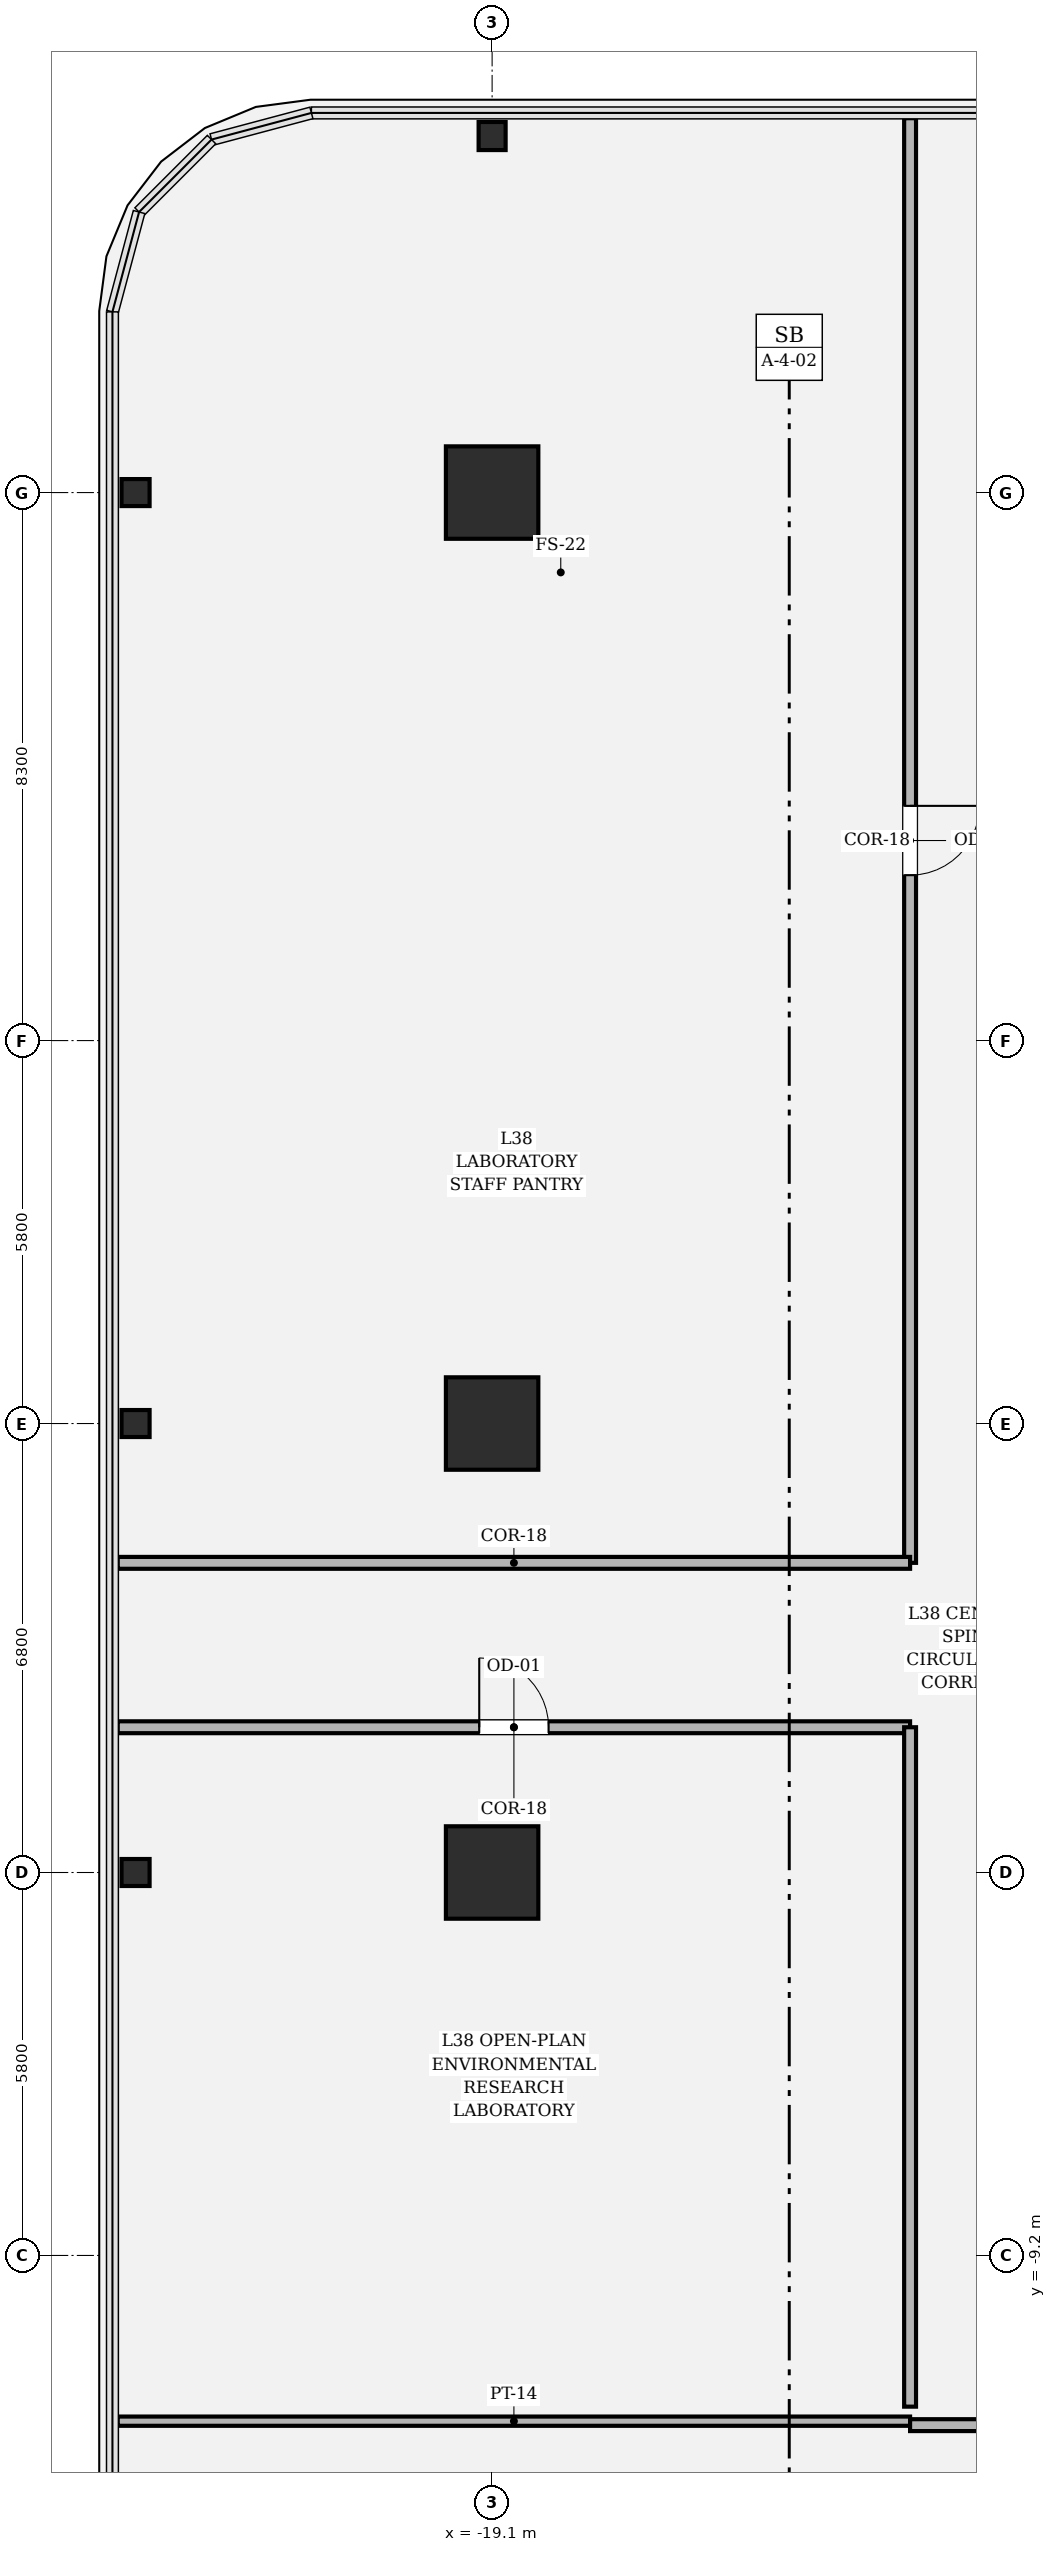
"""IFC4 building model, lengths in metres.
Left out: names, types, materials, properties, quantities, classifications, styles, units other than length and angle.
Written with IfcOpenShell. Run it as: python <this file> out.ifc"""

import sys

from ifc_helpers import new_model, si_unit, direction, frame, frame_2d, origin, origin_2d, place, context, subcontext, project, spatial, rectangle, hollow_rectangle, i_section, extrude, element, fill, save


model = new_model("IFC4")
c1 = context("Model", 3, precision=1e-05, world=origin(), true_north=direction((0.0, 1.0)))
c2 = subcontext(c1, "Body", "Model", "MODEL_VIEW")
j1 = project(units=[si_unit("LENGTHUNIT", "METRE"), si_unit("PLANEANGLEUNIT", "RADIAN")], contexts=[c1])
p1 = place(None, origin())
s1 = spatial("IfcSite", under=j1, at=p1, CompositionType="ELEMENT")
p2 = place(p1, origin())
s2 = spatial("IfcBuilding", under=s1, at=p2, CompositionType="ELEMENT")
p3 = place(p2, frame((0.0, 0.0, 164.1)))
s3 = spatial("IfcBuildingStorey", under=s2, at=p3, CompositionType="ELEMENT", Elevation=164.1)
for number, where, z_axis, x_axis in (
    (1, (-19.1, 17.5, 0.0), (0.0, 0.0, 1.0), (1.0, 0.0, 0.0)),
    (2, (-19.1, 3.4, 0.0), (0.0, 0.0, 1.0), (1.0, 0.0, 0.0)),
    (3, (-19.1, -3.4, 0.0), (0.0, 0.0, 1.0), (1.0, 0.0, 0.0)),
):
    element("IfcColumn", number, at=place(p3, frame(where, z_axis=z_axis, x_axis=x_axis)), inside=s3, PredefinedType="COLUMN", context=c2, shape_type="SweptSolid", body=[
        extrude(hollow_rectangle(XDim=1.4, YDim=1.4, WallThickness=0.042, at=origin_2d()), origin(), (0.0, 0.0, 1.0), 4.05),
    ])
for number, where, z_axis, x_axis in (
    (4, (-19.1, 22.9, 0.0), (0.0, 0.0, 1.0), (1.0, 0.0, 0.0)),
    (5, (-24.5, -3.4, 0.0), (0.0, 0.0, 1.0), (0.0, 1.0, 0.0)),
    (6, (-24.5, 3.4, 0.0), (0.0, 0.0, 1.0), (0.0, 1.0, 0.0)),
    (7, (-24.5, 17.5, 0.0), (0.0, 0.0, 1.0), (0.0, 1.0, 0.0)),
):
    element("IfcColumn", number, at=place(p3, frame(where, z_axis=z_axis, x_axis=x_axis)), inside=s3, PredefinedType="COLUMN", context=c2, shape_type="SweptSolid", body=[
        extrude(i_section(OverallWidth=0.409, OverallDepth=0.425, WebThickness=0.032, FlangeThickness=0.052, FilletRadius=0.018, at=origin_2d()), origin(), (0.0, 0.0, 1.0), 4.048),
    ])
p4 = place(p3, frame((-24.77, -11.71, 0.0), z_axis=(0.0, 0.0, 1.0), x_axis=(1.0, 0.0, 0.0)))
e8 = element("IfcWall", 8, at=p4, inside=s3, PredefinedType="PARTITIONING", context=c2, shape_type="SweptSolid", body=[
    extrude(rectangle(XDim=12.0, YDim=0.14, at=frame_2d((6.0, 0.0))), origin(), (0.0, 0.0, 1.0), 2.544),
])
p5 = place(p3, frame((-12.77, -11.77, 0.0), z_axis=(0.0, 0.0, 1.0), x_axis=(1.0, 0.0, 0.0)))
e9 = element("IfcWall", 9, at=p5, inside=s3, PredefinedType="PARTITIONING", context=c2, shape_type="SweptSolid", body=[
    extrude(rectangle(XDim=6.143, YDim=0.18, at=frame_2d((3.072, 0.0))), origin(), (0.0, 0.0, 1.0), 3.174),
])
p6 = place(p5, frame((2.546, 0.0, 0.0)))
e10 = element("IfcOpeningElement", 10, at=p6, cuts=e9, PredefinedType="OPENING", context=c2, shape_type="SweptSolid", body=[
    extrude(rectangle(XDim=1.05, YDim=2.2, at=frame_2d((0.525, 1.1))), frame((0.0, 0.1, 0.0), z_axis=(0.0, -1.0, 0.0), x_axis=(1.0, 0.0, 0.0)), (0.0, 0.0, 1.0), 0.2),
])
p7 = place(p3, frame((-24.77, -1.2, 0.0), z_axis=(0.0, 0.0, 1.0), x_axis=(1.0, 0.0, 0.0)))
e11 = element("IfcWall", 11, at=p7, inside=s3, PredefinedType="PARTITIONING", context=c2, shape_type="SweptSolid", body=[
    extrude(rectangle(XDim=12.0, YDim=0.18, at=frame_2d((6.0, 0.0))), origin(), (0.0, 0.0, 1.0), 2.544),
])
p8 = place(p7, frame((5.475, 0.0, 0.0)))
e12 = element("IfcOpeningElement", 12, at=p8, cuts=e11, PredefinedType="OPENING", context=c2, shape_type="SweptSolid", body=[
    extrude(rectangle(XDim=1.05, YDim=2.2, at=frame_2d((0.525, 1.1))), frame((0.0, 0.1, 0.0), z_axis=(0.0, -1.0, 0.0), x_axis=(1.0, 0.0, 0.0)), (0.0, 0.0, 1.0), 0.2),
])
p9 = place(p3, frame((-12.77, -1.2, 0.0), z_axis=(0.0, 0.0, 1.0), x_axis=(0.0, -1.0, 0.0)))
e13 = element("IfcWall", 13, at=p9, inside=s3, PredefinedType="PARTITIONING", context=c2, shape_type="SweptSolid", body=[
    extrude(rectangle(XDim=10.29, YDim=0.18, at=frame_2d((5.145, 0.0))), origin(), (0.0, 0.0, 1.0), 3.174),
])
p10 = place(p3, frame((-12.77, 23.17, 0.0), z_axis=(0.0, 0.0, 1.0), x_axis=(0.0, -1.0, 0.0)))
e14 = element("IfcWall", 14, at=p10, inside=s3, PredefinedType="PARTITIONING", context=c2, shape_type="SweptSolid", body=[
    extrude(rectangle(XDim=21.88, YDim=0.18, at=frame_2d((10.94, 0.0))), origin(), (0.0, 0.0, 1.0), 2.544),
])
p11 = place(p10, frame((10.415, 0.0, 0.0)))
e15 = element("IfcOpeningElement", 15, at=p11, cuts=e14, PredefinedType="OPENING", context=c2, shape_type="SweptSolid", body=[
    extrude(rectangle(XDim=1.05, YDim=2.2, at=frame_2d((0.525, 1.1))), frame((0.0, 0.1, 0.0), z_axis=(0.0, -1.0, 0.0), x_axis=(1.0, 0.0, 0.0)), (0.0, 0.0, 1.0), 0.2),
])
p12 = place(p3, frame((-12.77, 1.29, 0.0), z_axis=(0.0, 0.0, 1.0), x_axis=(-1.0, 0.0, 0.0)))
e16 = element("IfcWall", 16, at=p12, inside=s3, PredefinedType="PARTITIONING", context=c2, shape_type="SweptSolid", body=[
    extrude(rectangle(XDim=12.0, YDim=0.18, at=frame_2d((6.0, 0.0))), origin(), (0.0, 0.0, 1.0), 2.544),
])
p13 = place(p8, origin())
e17 = element("IfcDoor", 17, at=p13, inside=s3, OperationType="SINGLE_SWING_LEFT", PredefinedType="DOOR", context=c2, shape_type="SweptSolid", body=[
    extrude(rectangle(XDim=1.05, YDim=2.2, at=frame_2d((0.525, 1.1))), frame((0.0, 0.025, 0.0), z_axis=(0.0, -1.0, 0.0), x_axis=(1.0, 0.0, 0.0)), (0.0, 0.0, 1.0), 0.05),
])
fill(e12, e17)
p14 = place(p11, origin())
e18 = element("IfcDoor", 18, at=p14, inside=s3, OperationType="SINGLE_SWING_LEFT", PredefinedType="DOOR", context=c2, shape_type="SweptSolid", body=[
    extrude(rectangle(XDim=1.05, YDim=2.2, at=frame_2d((0.525, 1.1))), frame((0.0, 0.025, 0.0), z_axis=(0.0, -1.0, 0.0), x_axis=(1.0, 0.0, 0.0)), (0.0, 0.0, 1.0), 0.05),
])
fill(e15, e18)
save(model, sys.argv[1])
